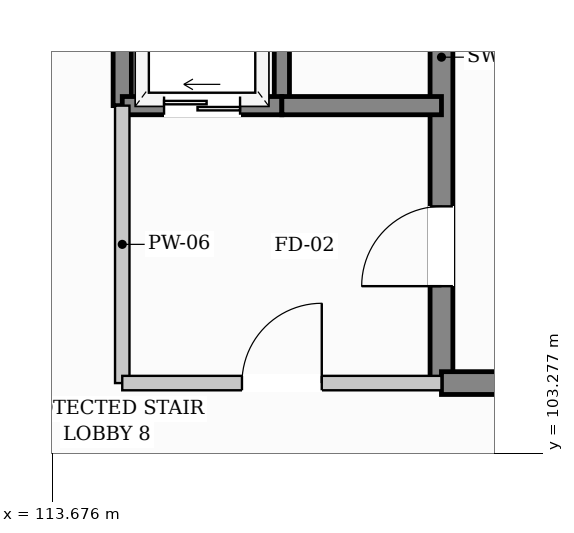
"""IFC4 building model, lengths in metres.
Left out: names, types, materials, properties, quantities, classifications, styles, units other than length and angle.
Written with IfcOpenShell. Run it as: python <this file> out.ifc"""

import sys

from ifc_helpers import new_model, si_unit, direction, frame, frame_2d, origin, place, context, subcontext, project, spatial, rectangle, extrude, element, fill, save


model = new_model("IFC4")
c1 = context("Model", 3, precision=1e-05, world=origin(), true_north=direction((0.0, 1.0)))
c2 = subcontext(c1, "Body", "Model", "MODEL_VIEW")
j1 = project(units=[si_unit("LENGTHUNIT", "METRE"), si_unit("PLANEANGLEUNIT", "RADIAN")], contexts=[c1])
p1 = place(None, origin())
s1 = spatial("IfcSite", under=j1, at=p1, CompositionType="ELEMENT")
p2 = place(p1, origin())
s2 = spatial("IfcBuilding", under=s1, at=p2, CompositionType="ELEMENT")
p3 = place(p2, frame((0.0, 0.0, 9.6)))
s3 = spatial("IfcBuildingStorey", under=s2, at=p3, CompositionType="ELEMENT", Elevation=9.6)
p4 = place(p3, frame((118.8, 104.2, 0.0), z_axis=(0.0, 0.0, 1.0), x_axis=(0.0, 1.0, 0.0)))
e1 = element("IfcWall", 1, at=p4, inside=s3, PredefinedType="SHEAR", context=c2, shape_type="SweptSolid", body=[
    extrude(rectangle(XDim=6.0, YDim=0.3, at=frame_2d((3.0, 0.0))), origin(), (0.0, 0.0, 1.0), 3.32),
])
p5 = place(p4, frame((1.275, 0.0, 0.0)))
e2 = element("IfcOpeningElement", 2, at=p5, cuts=e1, PredefinedType="OPENING", context=c2, shape_type="SweptSolid", body=[
    extrude(rectangle(XDim=1.05, YDim=2.15, at=frame_2d((0.525, 1.075))), frame((0.0, 0.16, 0.0), z_axis=(0.0, -1.0, 0.0), x_axis=(1.0, 0.0, 0.0)), (0.0, 0.0, 1.0), 0.32),
])
p6 = place(p3, frame((118.8, 104.2, 0.0), z_axis=(0.0, 0.0, 1.0), x_axis=(1.0, 0.0, 0.0)))
e3 = element("IfcWall", 3, at=p6, inside=s3, PredefinedType="SHEAR", context=c2, shape_type="SweptSolid", body=[
    extrude(rectangle(XDim=7.0, YDim=0.3, at=frame_2d((3.5, 0.0))), origin(), (0.0, 0.0, 1.0), 3.32),
])
p7 = place(p3, frame((114.6, 107.85, 0.0), z_axis=(0.0, 0.0, 1.0), x_axis=(0.0, 1.0, 0.0)))
e4 = element("IfcWall", 4, at=p7, inside=s3, PredefinedType="SHEAR", context=c2, shape_type="SweptSolid", body=[
    extrude(rectangle(XDim=2.35, YDim=0.24, at=frame_2d((1.175, 0.0))), origin(), (0.0, 0.0, 1.0), 3.32),
])
p8 = place(p3, frame((116.7, 107.85, 0.0), z_axis=(0.0, 0.0, 1.0), x_axis=(0.0, 1.0, 0.0)))
e5 = element("IfcWall", 5, at=p8, inside=s3, PredefinedType="SHEAR", context=c2, shape_type="SweptSolid", body=[
    extrude(rectangle(XDim=2.35, YDim=0.2, at=frame_2d((1.175, 0.0))), origin(), (0.0, 0.0, 1.0), 3.32),
])
p9 = place(p3, frame((114.6, 107.85, 0.0), z_axis=(0.0, 0.0, 1.0), x_axis=(1.0, 0.0, 0.0)))
e6 = element("IfcWall", 6, at=p9, inside=s3, PredefinedType="SHEAR", context=c2, shape_type="SweptSolid", body=[
    extrude(rectangle(XDim=2.1, YDim=0.24, at=frame_2d((1.05, 0.0))), origin(), (0.0, 0.0, 1.0), 3.32),
])
p10 = place(p9, frame((0.55, 0.0, 0.0)))
e7 = element("IfcOpeningElement", 7, at=p10, cuts=e6, PredefinedType="OPENING", context=c2, shape_type="SweptSolid", body=[
    extrude(rectangle(XDim=1.0, YDim=2.1, at=frame_2d((0.5, 1.05))), frame((0.0, 0.13, 0.0), z_axis=(0.0, -1.0, 0.0), x_axis=(1.0, 0.0, 0.0)), (0.0, 0.0, 1.0), 0.26),
])
p11 = place(p3, frame((116.7, 107.85, 0.0), z_axis=(0.0, 0.0, 1.0), x_axis=(1.0, 0.0, 0.0)))
e8 = element("IfcWall", 8, at=p11, inside=s3, PredefinedType="SHEAR", context=c2, shape_type="SweptSolid", body=[
    extrude(rectangle(XDim=2.1, YDim=0.24, at=frame_2d((1.05, 0.0))), origin(), (0.0, 0.0, 1.0), 3.32),
])
p12 = place(p3, frame((114.6, 104.2, 0.0), z_axis=(0.0, 0.0, 1.0), x_axis=(0.0, 1.0, 0.0)))
e9 = element("IfcWall", 9, at=p12, inside=s3, PredefinedType="PARTITIONING", context=c2, shape_type="SweptSolid", body=[
    extrude(rectangle(XDim=3.65, YDim=0.19, at=frame_2d((1.825, 0.0))), origin(), (0.0, 0.0, 1.0), 3.32),
])
p13 = place(p3, frame((114.6, 104.2, 0.0), z_axis=(0.0, 0.0, 1.0), x_axis=(1.0, 0.0, 0.0)))
e10 = element("IfcWall", 10, at=p13, inside=s3, PredefinedType="PARTITIONING", context=c2, shape_type="SweptSolid", body=[
    extrude(rectangle(XDim=4.2, YDim=0.19, at=frame_2d((2.1, 0.0))), origin(), (0.0, 0.0, 1.0), 3.32),
])
p14 = place(p13, frame((1.575, 0.0, 0.0)))
e11 = element("IfcOpeningElement", 11, at=p14, cuts=e10, PredefinedType="OPENING", context=c2, shape_type="SweptSolid", body=[
    extrude(rectangle(XDim=1.05, YDim=2.15, at=frame_2d((0.525, 1.075))), frame((0.0, 0.105, 0.0), z_axis=(0.0, -1.0, 0.0), x_axis=(1.0, 0.0, 0.0)), (0.0, 0.0, 1.0), 0.21),
])
p15 = place(p5, origin())
e12 = element("IfcDoor", 12, at=p15, inside=s3, OperationType="SINGLE_SWING_LEFT", PredefinedType="DOOR", context=c2, shape_type="SweptSolid", body=[
    extrude(rectangle(XDim=1.05, YDim=2.15, at=frame_2d((0.525, 1.075))), frame((0.0, 0.025, 0.0), z_axis=(0.0, -1.0, 0.0), x_axis=(1.0, 0.0, 0.0)), (0.0, 0.0, 1.0), 0.05),
])
fill(e2, e12)
p16 = place(p10, origin())
e13 = element("IfcDoor", 13, at=p16, inside=s3, OperationType="SLIDING_TO_LEFT", PredefinedType="DOOR", context=c2, shape_type="SweptSolid", body=[
    extrude(rectangle(XDim=1.0, YDim=2.1, at=frame_2d((0.5, 1.05))), frame((0.0, 0.025, 0.0), z_axis=(0.0, -1.0, 0.0), x_axis=(1.0, 0.0, 0.0)), (0.0, 0.0, 1.0), 0.05),
])
fill(e7, e13)
p17 = place(p14, origin())
e14 = element("IfcDoor", 14, at=p17, inside=s3, OperationType="SINGLE_SWING_RIGHT", PredefinedType="DOOR", context=c2, shape_type="SweptSolid", body=[
    extrude(rectangle(XDim=1.05, YDim=2.15, at=frame_2d((0.525, 1.075))), frame((0.0, 0.025, 0.0), z_axis=(0.0, -1.0, 0.0), x_axis=(1.0, 0.0, 0.0)), (0.0, 0.0, 1.0), 0.05),
])
fill(e11, e14)
save(model, sys.argv[1])
